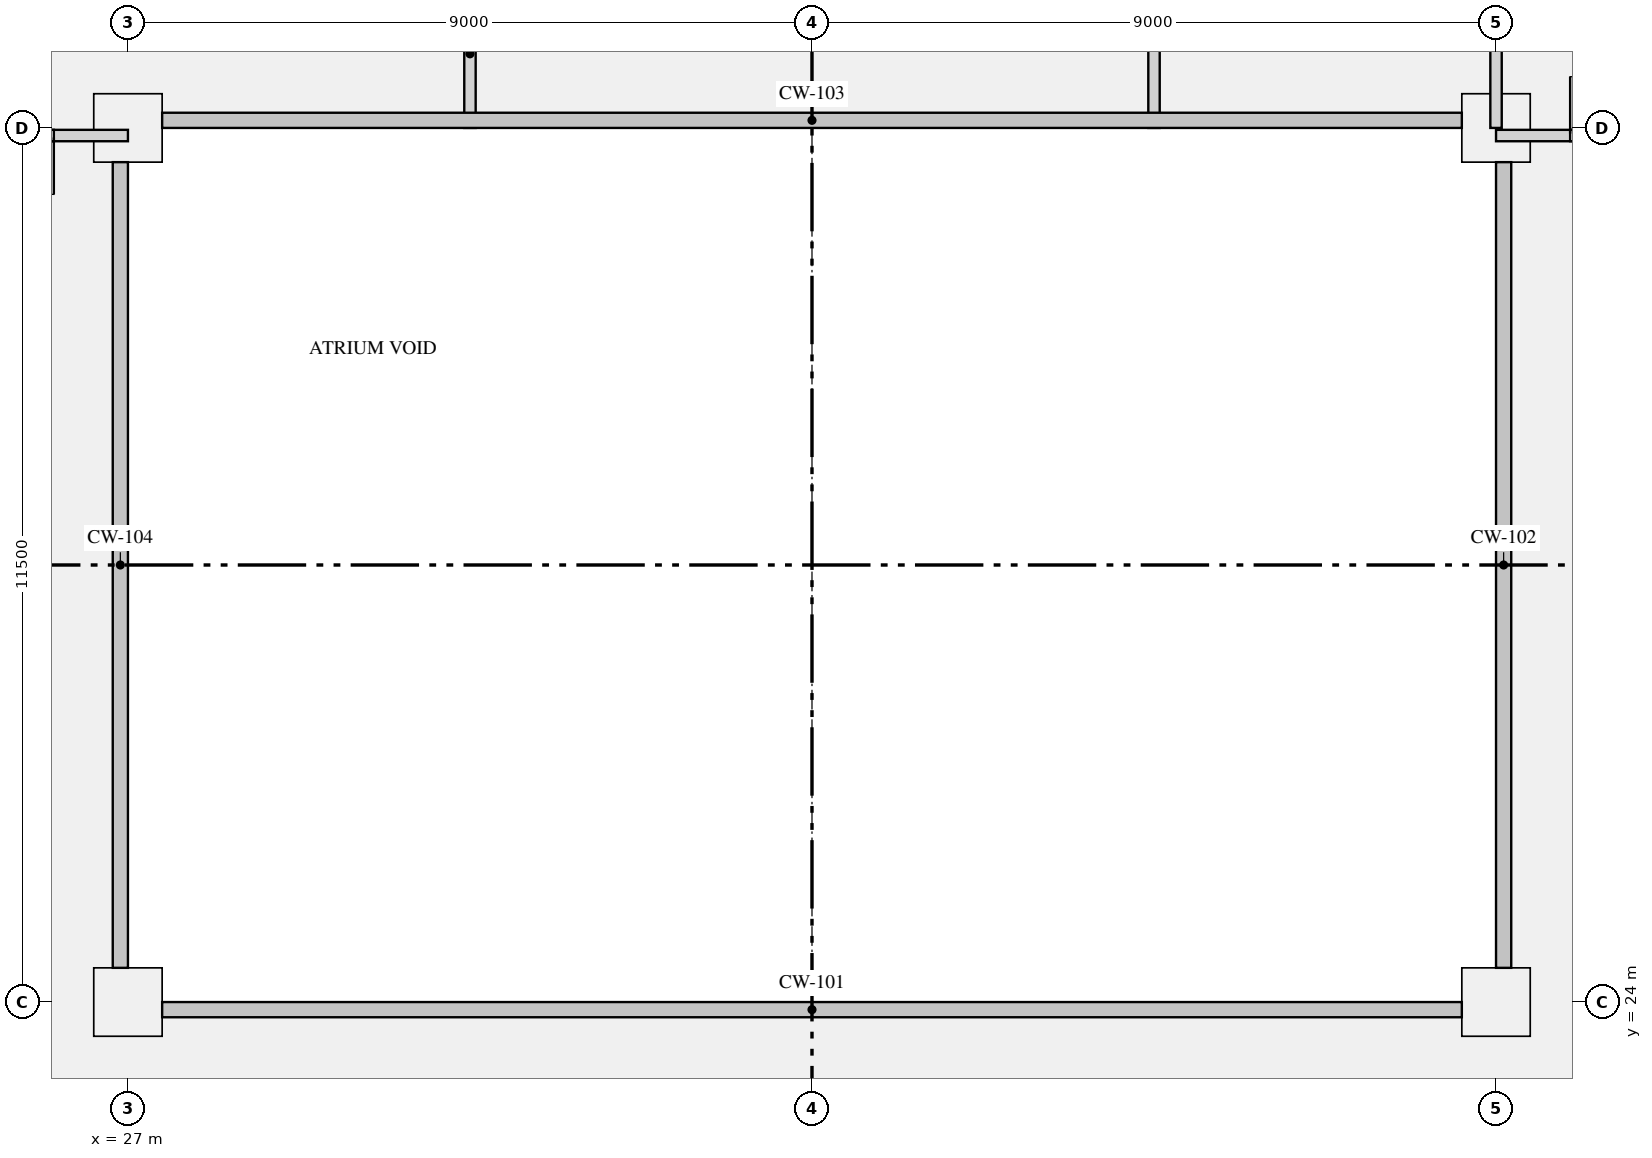
"""IFC4 building model, lengths in metres.
Left out: names, types, materials, properties, quantities, classifications, styles, units other than length and angle.
Written with IfcOpenShell. Run it as: python <this file> out.ifc"""

import sys

from ifc_helpers import new_model, si_unit, direction, frame, frame_2d, origin, origin_2d, place, context, subcontext, project, spatial, rectangle, extrude, element, fill, save


model = new_model("IFC4")
c1 = context("Model", 3, precision=1e-05, world=origin(), true_north=direction((0.0, 1.0)))
c2 = subcontext(c1, "Body", "Model", "MODEL_VIEW")
j1 = project(units=[si_unit("LENGTHUNIT", "METRE"), si_unit("PLANEANGLEUNIT", "RADIAN")], contexts=[c1])
p1 = place(None, origin())
s1 = spatial("IfcSite", under=j1, at=p1, CompositionType="ELEMENT")
p2 = place(p1, origin())
s2 = spatial("IfcBuilding", under=s1, at=p2, CompositionType="ELEMENT")
p3 = place(p2, frame((0.0, 0.0, 191.7)))
s3 = spatial("IfcBuildingStorey", under=s2, at=p3, CompositionType="ELEMENT", Elevation=191.7)
for number, where, z_axis, x_axis in (
    (1, (27.0, 24.0, 0.0), (0.0, 0.0, 1.0), (1.0, 0.0, 0.0)),
    (2, (45.0, 24.0, 0.0), (0.0, 0.0, 1.0), (1.0, 0.0, 0.0)),
    (3, (27.0, 35.5, 0.0), (0.0, 0.0, 1.0), (1.0, 0.0, 0.0)),
    (4, (45.0, 35.5, 0.0), (0.0, 0.0, 1.0), (1.0, 0.0, 0.0)),
):
    element("IfcColumn", number, at=place(p3, frame(where, z_axis=z_axis, x_axis=x_axis)), inside=s3, PredefinedType="COLUMN", context=c2, shape_type="SweptSolid", body=[
        extrude(rectangle(XDim=0.9, YDim=0.9, at=origin_2d()), origin(), (0.0, 0.0, 1.0), 6.3),
    ])
p4 = place(p3, frame((15.8, 35.4, 0.0), z_axis=(0.0, 0.0, 1.0), x_axis=(1.0, 0.0, 0.0)))
e5 = element("IfcWall", 5, at=p4, inside=s3, PredefinedType="PARTITIONING", context=c2, shape_type="SweptSolid", body=[
    extrude(rectangle(XDim=11.2, YDim=0.15, at=frame_2d((5.6, 0.0))), origin(), (0.0, 0.0, 1.0), 5.98),
])
p5 = place(p4, frame((8.725, 0.0, 0.0)))
e6 = element("IfcOpeningElement", 6, at=p5, cuts=e5, PredefinedType="OPENING", context=c2, shape_type="SweptSolid", body=[
    extrude(rectangle(XDim=1.5, YDim=2.1, at=frame_2d((0.75, 1.05))), frame((0.0, 0.085, 0.0), z_axis=(0.0, -1.0, 0.0), x_axis=(1.0, 0.0, 0.0)), (0.0, 0.0, 1.0), 0.17),
])
p6 = place(p4, frame((4.975, 0.0, 0.0)))
e7 = element("IfcOpeningElement", 7, at=p6, cuts=e5, PredefinedType="OPENING", context=c2, shape_type="SweptSolid", body=[
    extrude(rectangle(XDim=0.9, YDim=2.1, at=frame_2d((0.45, 1.05))), frame((0.0, 0.085, 0.0), z_axis=(0.0, -1.0, 0.0), x_axis=(1.0, 0.0, 0.0)), (0.0, 0.0, 1.0), 0.17),
])
p7 = place(p3, frame((45.0, 35.4, 0.0), z_axis=(0.0, 0.0, 1.0), x_axis=(1.0, 0.0, 0.0)))
e8 = element("IfcWall", 8, at=p7, inside=s3, PredefinedType="PARTITIONING", context=c2, shape_type="SweptSolid", body=[
    extrude(rectangle(XDim=11.2, YDim=0.15, at=frame_2d((5.6, 0.0))), origin(), (0.0, 0.0, 1.0), 5.98),
])
p8 = place(p7, frame((0.975, 0.0, 0.0)))
e9 = element("IfcOpeningElement", 9, at=p8, cuts=e8, PredefinedType="OPENING", context=c2, shape_type="SweptSolid", body=[
    extrude(rectangle(XDim=1.5, YDim=2.1, at=frame_2d((0.75, 1.05))), frame((0.0, 0.085, 0.0), z_axis=(0.0, -1.0, 0.0), x_axis=(1.0, 0.0, 0.0)), (0.0, 0.0, 1.0), 0.17),
])
p9 = place(p7, frame((5.0, 0.0, 0.0)))
e10 = element("IfcOpeningElement", 10, at=p9, cuts=e8, PredefinedType="OPENING", context=c2, shape_type="SweptSolid", body=[
    extrude(rectangle(XDim=1.5, YDim=2.1, at=frame_2d((0.75, 1.05))), frame((0.0, 0.085, 0.0), z_axis=(0.0, -1.0, 0.0), x_axis=(1.0, 0.0, 0.0)), (0.0, 0.0, 1.0), 0.17),
])
p10 = place(p3, frame((31.5, 35.5, 0.0), z_axis=(0.0, 0.0, 1.0), x_axis=(0.0, 1.0, 0.0)))
e11 = element("IfcWall", 11, at=p10, inside=s3, PredefinedType="PARTITIONING", context=c2, shape_type="SweptSolid", body=[
    extrude(rectangle(XDim=5.35, YDim=0.15, at=frame_2d((2.675, 0.0))), origin(), (0.0, 0.0, 1.0), 5.98),
])
p11 = place(p10, frame((1.95, 0.0, 0.0)))
e12 = element("IfcOpeningElement", 12, at=p11, cuts=e11, PredefinedType="OPENING", context=c2, shape_type="SweptSolid", body=[
    extrude(rectangle(XDim=1.5, YDim=2.1, at=frame_2d((0.75, 1.05))), frame((0.0, 0.085, 0.0), z_axis=(0.0, -1.0, 0.0), x_axis=(1.0, 0.0, 0.0)), (0.0, 0.0, 1.0), 0.17),
])
p12 = place(p3, frame((40.5, 35.5, 0.0), z_axis=(0.0, 0.0, 1.0), x_axis=(0.0, 1.0, 0.0)))
e13 = element("IfcWall", 13, at=p12, inside=s3, PredefinedType="PARTITIONING", context=c2, shape_type="SweptSolid", body=[
    extrude(rectangle(XDim=5.35, YDim=0.15, at=frame_2d((2.675, 0.0))), origin(), (0.0, 0.0, 1.0), 5.98),
])
p13 = place(p3, frame((45.0, 35.5, 0.0), z_axis=(0.0, 0.0, 1.0), x_axis=(0.0, 1.0, 0.0)))
e14 = element("IfcWall", 14, at=p13, inside=s3, PredefinedType="PARTITIONING", context=c2, shape_type="SweptSolid", body=[
    extrude(rectangle(XDim=5.35, YDim=0.15, at=frame_2d((2.675, 0.0))), origin(), (0.0, 0.0, 1.0), 5.98),
])
p14 = place(p13, frame((2.525, 0.0, 0.0)))
e15 = element("IfcOpeningElement", 15, at=p14, cuts=e14, PredefinedType="OPENING", context=c2, shape_type="SweptSolid", body=[
    extrude(rectangle(XDim=0.9, YDim=2.1, at=frame_2d((0.45, 1.05))), frame((0.0, 0.085, 0.0), z_axis=(0.0, -1.0, 0.0), x_axis=(1.0, 0.0, 0.0)), (0.0, 0.0, 1.0), 0.17),
])
p15 = place(p5, frame((1.5, 0.0, 0.0), z_axis=(0.0, 0.0, 1.0), x_axis=(-1.0, 0.0, 0.0)))
e16 = element("IfcDoor", 16, at=p15, inside=s3, OperationType="DOUBLE_DOOR_SINGLE_SWING", PredefinedType="DOOR", context=c2, shape_type="SweptSolid", body=[
    extrude(rectangle(XDim=1.5, YDim=2.1, at=frame_2d((0.75, 1.05))), frame((0.0, 0.025, 0.0), z_axis=(0.0, -1.0, 0.0), x_axis=(1.0, 0.0, 0.0)), (0.0, 0.0, 1.0), 0.05),
])
fill(e6, e16)
p16 = place(p8, origin())
e17 = element("IfcDoor", 17, at=p16, inside=s3, OperationType="DOUBLE_DOOR_SINGLE_SWING", PredefinedType="DOOR", context=c2, shape_type="SweptSolid", body=[
    extrude(rectangle(XDim=1.5, YDim=2.1, at=frame_2d((0.75, 1.05))), frame((0.0, 0.025, 0.0), z_axis=(0.0, -1.0, 0.0), x_axis=(1.0, 0.0, 0.0)), (0.0, 0.0, 1.0), 0.05),
])
fill(e9, e17)
save(model, sys.argv[1])
